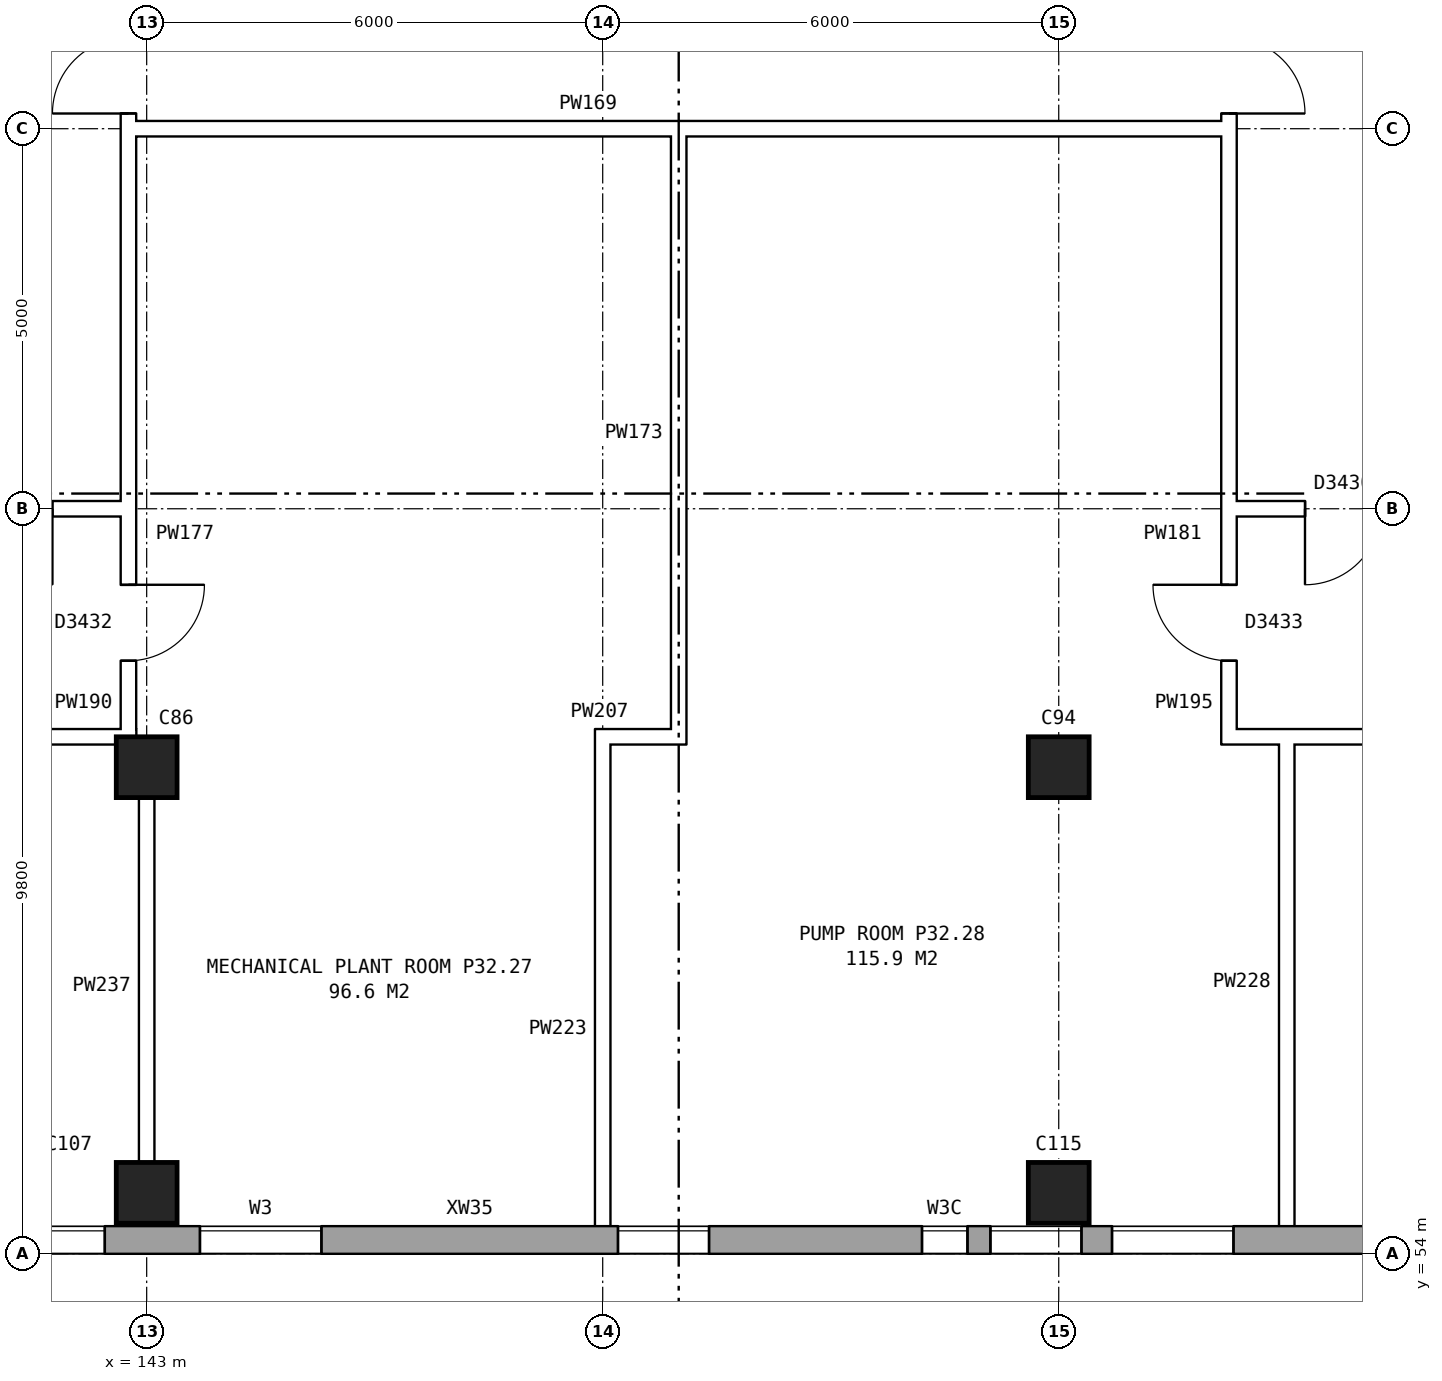
"""IFC4 building model, lengths in metres.
Left out: names, types, materials, properties, quantities, classifications, styles, units other than length and angle.
Written with IfcOpenShell. Run it as: python <this file> out.ifc"""

import sys

from ifc_helpers import new_model, si_unit, direction, frame, frame_2d, origin, origin_2d, place, context, subcontext, project, spatial, rectangle, extrude, element, fill, save


model = new_model("IFC4")
c1 = context("Model", 3, precision=1e-05, world=origin(), true_north=direction((0.0, 1.0)))
c2 = subcontext(c1, "Body", "Model", "MODEL_VIEW")
j1 = project(units=[si_unit("LENGTHUNIT", "METRE"), si_unit("PLANEANGLEUNIT", "RADIAN")], contexts=[c1])
p1 = place(None, origin())
s1 = spatial("IfcSite", under=j1, at=p1, CompositionType="ELEMENT")
p2 = place(p1, origin())
s2 = spatial("IfcBuilding", under=s1, at=p2, CompositionType="ELEMENT")
p3 = place(p2, frame((0.0, 0.0, 115.0)))
s3 = spatial("IfcBuildingStorey", under=s2, at=p3, CompositionType="ELEMENT", Elevation=115.0)
for number, where, z_axis, x_axis in (
    (1, (143.0, 54.8, 0.0), (0.0, 0.0, 1.0), (1.0, 0.0, 0.0)),
    (2, (143.0, 60.4, 0.0), (0.0, 0.0, 1.0), (1.0, 0.0, 0.0)),
    (3, (155.0, 54.8, 0.0), (0.0, 0.0, 1.0), (1.0, 0.0, 0.0)),
    (4, (155.0, 60.4, 0.0), (0.0, 0.0, 1.0), (1.0, 0.0, 0.0)),
):
    element("IfcColumn", number, at=place(p3, frame(where, z_axis=z_axis, x_axis=x_axis)), inside=s3, PredefinedType="COLUMN", context=c2, shape_type="SweptSolid", body=[
        extrude(rectangle(XDim=0.8, YDim=0.8, at=origin_2d()), origin(), (0.0, 0.0, 1.0), 4.2),
    ])
p4 = place(p3, frame((134.075, 54.18, 0.0), z_axis=(0.0, 0.0, 1.0), x_axis=(1.0, 0.0, 0.0)))
e5 = element("IfcWall", 5, at=p4, inside=s3, PredefinedType="STANDARD", context=c2, shape_type="SweptSolid", body=[
    extrude(rectangle(XDim=35.601, YDim=0.36, at=frame_2d((17.8, 0.0))), origin(), (0.0, 0.0, 1.0), 4.2),
])
p5 = place(p4, frame((3.125, 0.0, 1.5)))
e6 = element("IfcOpeningElement", 6, at=p5, cuts=e5, PredefinedType="OPENING", context=c2, shape_type="SweptSolid", body=[
    extrude(rectangle(XDim=1.2, YDim=1.2, at=frame_2d((0.6, 0.6))), frame((0.0, 0.19, 0.0), z_axis=(0.0, -1.0, 0.0), x_axis=(1.0, 0.0, 0.0)), (0.0, 0.0, 1.0), 0.38),
])
p6 = place(p4, frame((7.175, 0.0, 1.5)))
e7 = element("IfcOpeningElement", 7, at=p6, cuts=e5, PredefinedType="OPENING", context=c2, shape_type="SweptSolid", body=[
    extrude(rectangle(XDim=1.2, YDim=1.2, at=frame_2d((0.6, 0.6))), frame((0.0, 0.19, 0.0), z_axis=(0.0, -1.0, 0.0), x_axis=(1.0, 0.0, 0.0)), (0.0, 0.0, 1.0), 0.38),
])
p7 = place(p4, frame((9.625, 0.0, 1.5)))
e8 = element("IfcOpeningElement", 8, at=p7, cuts=e5, PredefinedType="OPENING", context=c2, shape_type="SweptSolid", body=[
    extrude(rectangle(XDim=1.6, YDim=1.2, at=frame_2d((0.8, 0.6))), frame((0.0, 0.19, 0.0), z_axis=(0.0, -1.0, 0.0), x_axis=(1.0, 0.0, 0.0)), (0.0, 0.0, 1.0), 0.38),
])
p8 = place(p4, frame((15.125, 0.0, 1.5)))
e9 = element("IfcOpeningElement", 9, at=p8, cuts=e5, PredefinedType="OPENING", context=c2, shape_type="SweptSolid", body=[
    extrude(rectangle(XDim=1.2, YDim=1.2, at=frame_2d((0.6, 0.6))), frame((0.0, 0.19, 0.0), z_axis=(0.0, -1.0, 0.0), x_axis=(1.0, 0.0, 0.0)), (0.0, 0.0, 1.0), 0.38),
])
p9 = place(p4, frame((19.125, 0.0, 1.5)))
e10 = element("IfcOpeningElement", 10, at=p9, cuts=e5, PredefinedType="OPENING", context=c2, shape_type="SweptSolid", body=[
    extrude(rectangle(XDim=0.6, YDim=1.2, at=frame_2d((0.3, 0.6))), frame((0.0, 0.19, 0.0), z_axis=(0.0, -1.0, 0.0), x_axis=(1.0, 0.0, 0.0)), (0.0, 0.0, 1.0), 0.38),
])
p10 = place(p4, frame((21.625, 0.0, 1.5)))
e11 = element("IfcOpeningElement", 11, at=p10, cuts=e5, PredefinedType="OPENING", context=c2, shape_type="SweptSolid", body=[
    extrude(rectangle(XDim=1.6, YDim=1.2, at=frame_2d((0.8, 0.6))), frame((0.0, 0.19, 0.0), z_axis=(0.0, -1.0, 0.0), x_axis=(1.0, 0.0, 0.0)), (0.0, 0.0, 1.0), 0.38),
])
p11 = place(p4, frame((26.375, 0.0, 1.5)))
e12 = element("IfcOpeningElement", 12, at=p11, cuts=e5, PredefinedType="OPENING", context=c2, shape_type="SweptSolid", body=[
    extrude(rectangle(XDim=1.6, YDim=1.2, at=frame_2d((0.8, 0.6))), frame((0.0, 0.19, 0.0), z_axis=(0.0, -1.0, 0.0), x_axis=(1.0, 0.0, 0.0)), (0.0, 0.0, 1.0), 0.38),
])
p12 = place(p4, frame((31.125, 0.0, 1.5)))
e13 = element("IfcOpeningElement", 13, at=p12, cuts=e5, PredefinedType="OPENING", context=c2, shape_type="SweptSolid", body=[
    extrude(rectangle(XDim=0.6, YDim=1.2, at=frame_2d((0.3, 0.6))), frame((0.0, 0.19, 0.0), z_axis=(0.0, -1.0, 0.0), x_axis=(1.0, 0.0, 0.0)), (0.0, 0.0, 1.0), 0.38),
])
p13 = place(p4, frame((33.625, 0.0, 1.5)))
e14 = element("IfcOpeningElement", 14, at=p13, cuts=e5, PredefinedType="OPENING", context=c2, shape_type="SweptSolid", body=[
    extrude(rectangle(XDim=1.6, YDim=1.2, at=frame_2d((0.8, 0.6))), frame((0.0, 0.19, 0.0), z_axis=(0.0, -1.0, 0.0), x_axis=(1.0, 0.0, 0.0)), (0.0, 0.0, 1.0), 0.38),
])
p14 = place(p4, frame((20.025, 0.0, 1.5)))
e15 = element("IfcOpeningElement", 15, at=p14, cuts=e5, PredefinedType="OPENING", context=c2, shape_type="SweptSolid", body=[
    extrude(rectangle(XDim=1.2, YDim=1.2, at=frame_2d((0.6, 0.6))), frame((0.0, 0.19, 0.0), z_axis=(0.0, -1.0, 0.0), x_axis=(1.0, 0.0, 0.0)), (0.0, 0.0, 1.0), 0.38),
])
p15 = place(p4, frame((32.025, 0.0, 1.5)))
e16 = element("IfcOpeningElement", 16, at=p15, cuts=e5, PredefinedType="OPENING", context=c2, shape_type="SweptSolid", body=[
    extrude(rectangle(XDim=1.2, YDim=1.2, at=frame_2d((0.6, 0.6))), frame((0.0, 0.19, 0.0), z_axis=(0.0, -1.0, 0.0), x_axis=(1.0, 0.0, 0.0)), (0.0, 0.0, 1.0), 0.38),
])
p16 = place(p3, frame((142.76, 63.9, 0.0), z_axis=(0.0, 0.0, 1.0), x_axis=(0.0, 1.0, 0.0)))
e17 = element("IfcWall", 17, at=p16, inside=s3, PredefinedType="PARTITIONING", context=c2, shape_type="SweptSolid", body=[
    extrude(rectangle(XDim=12.2, YDim=0.2, at=frame_2d((6.1, 0.0))), origin(), (0.0, 0.0, 1.0), 4.2),
])
p17 = place(p16, frame((5.1, 0.0, 0.0)))
e18 = element("IfcOpeningElement", 18, at=p17, cuts=e17, PredefinedType="OPENING", context=c2, shape_type="SweptSolid", body=[
    extrude(rectangle(XDim=2.0, YDim=2.1, at=frame_2d((1.0, 1.05))), frame((0.0, 0.11, 0.0), z_axis=(0.0, -1.0, 0.0), x_axis=(1.0, 0.0, 0.0)), (0.0, 0.0, 1.0), 0.22),
])
p18 = place(p3, frame((157.24, 63.9, 0.0), z_axis=(0.0, 0.0, 1.0), x_axis=(0.0, 1.0, 0.0)))
e19 = element("IfcWall", 19, at=p18, inside=s3, PredefinedType="PARTITIONING", context=c2, shape_type="SweptSolid", body=[
    extrude(rectangle(XDim=12.2, YDim=0.2, at=frame_2d((6.1, 0.0))), origin(), (0.0, 0.0, 1.0), 4.2),
])
p19 = place(p18, frame((5.1, 0.0, 0.0)))
e20 = element("IfcOpeningElement", 20, at=p19, cuts=e19, PredefinedType="OPENING", context=c2, shape_type="SweptSolid", body=[
    extrude(rectangle(XDim=2.0, YDim=2.1, at=frame_2d((1.0, 1.05))), frame((0.0, 0.11, 0.0), z_axis=(0.0, -1.0, 0.0), x_axis=(1.0, 0.0, 0.0)), (0.0, 0.0, 1.0), 0.22),
])
p20 = place(p3, frame((131.24, 60.8, 0.0), z_axis=(0.0, 0.0, 1.0), x_axis=(1.0, 0.0, 0.0)))
e21 = element("IfcWall", 21, at=p20, inside=s3, PredefinedType="PARTITIONING", context=c2, shape_type="SweptSolid", body=[
    extrude(rectangle(XDim=11.622, YDim=0.2, at=frame_2d((5.811, 0.0))), origin(), (0.0, 0.0, 1.0), 4.2),
])
p21 = place(p20, frame((2.44, 0.0, 0.0)))
e22 = element("IfcOpeningElement", 22, at=p21, cuts=e21, PredefinedType="OPENING", context=c2, shape_type="SweptSolid", body=[
    extrude(rectangle(XDim=1.0, YDim=2.1, at=frame_2d((0.5, 1.05))), frame((0.0, 0.11, 0.0), z_axis=(0.0, -1.0, 0.0), x_axis=(1.0, 0.0, 0.0)), (0.0, 0.0, 1.0), 0.22),
])
p22 = place(p20, frame((8.141, 0.0, 0.0)))
e23 = element("IfcOpeningElement", 23, at=p22, cuts=e21, PredefinedType="OPENING", context=c2, shape_type="SweptSolid", body=[
    extrude(rectangle(XDim=1.0, YDim=2.1, at=frame_2d((0.5, 1.05))), frame((0.0, 0.11, 0.0), z_axis=(0.0, -1.0, 0.0), x_axis=(1.0, 0.0, 0.0)), (0.0, 0.0, 1.0), 0.22),
])
p23 = place(p3, frame((148.9, 60.8, 0.0), z_axis=(0.0, 0.0, 1.0), x_axis=(1.0, 0.0, 0.0)))
e24 = element("IfcWall", 24, at=p23, inside=s3, PredefinedType="PARTITIONING", context=c2, shape_type="SweptSolid", body=[
    extrude(rectangle(XDim=1.2, YDim=0.2, at=frame_2d((0.6, 0.0))), origin(), (0.0, 0.0, 1.0), 4.2),
])
p24 = place(p3, frame((157.14, 60.8, 0.0), z_axis=(0.0, 0.0, 1.0), x_axis=(1.0, 0.0, 0.0)))
e25 = element("IfcWall", 25, at=p24, inside=s3, PredefinedType="PARTITIONING", context=c2, shape_type="SweptSolid", body=[
    extrude(rectangle(XDim=15.37, YDim=0.2, at=frame_2d((7.685, 0.0))), origin(), (0.0, 0.0, 1.0), 4.2),
])
p25 = place(p24, frame((3.36, 0.0, 0.0)))
e26 = element("IfcOpeningElement", 26, at=p25, cuts=e25, PredefinedType="OPENING", context=c2, shape_type="SweptSolid", body=[
    extrude(rectangle(XDim=1.0, YDim=2.1, at=frame_2d((0.5, 1.05))), frame((0.0, 0.11, 0.0), z_axis=(0.0, -1.0, 0.0), x_axis=(1.0, 0.0, 0.0)), (0.0, 0.0, 1.0), 0.22),
])
p26 = place(p24, frame((8.155, 0.0, 0.0)))
e27 = element("IfcOpeningElement", 27, at=p26, cuts=e25, PredefinedType="OPENING", context=c2, shape_type="SweptSolid", body=[
    extrude(rectangle(XDim=1.0, YDim=2.1, at=frame_2d((0.5, 1.05))), frame((0.0, 0.11, 0.0), z_axis=(0.0, -1.0, 0.0), x_axis=(1.0, 0.0, 0.0)), (0.0, 0.0, 1.0), 0.22),
])
p27 = place(p3, frame((139.76, 63.8, 0.0), z_axis=(0.0, 0.0, 1.0), x_axis=(1.0, 0.0, 0.0)))
e28 = element("IfcWall", 28, at=p27, inside=s3, PredefinedType="PARTITIONING", context=c2, shape_type="SweptSolid", body=[
    extrude(rectangle(XDim=3.1, YDim=0.2, at=frame_2d((1.55, 0.0))), origin(), (0.0, 0.0, 1.0), 4.2),
])
p28 = place(p27, frame((1.0, 0.0, 0.0)))
e29 = element("IfcOpeningElement", 29, at=p28, cuts=e28, PredefinedType="OPENING", context=c2, shape_type="SweptSolid", body=[
    extrude(rectangle(XDim=1.0, YDim=2.1, at=frame_2d((0.5, 1.05))), frame((0.0, 0.11, 0.0), z_axis=(0.0, -1.0, 0.0), x_axis=(1.0, 0.0, 0.0)), (0.0, 0.0, 1.0), 0.22),
])
p29 = place(p3, frame((157.14, 63.8, 0.0), z_axis=(0.0, 0.0, 1.0), x_axis=(1.0, 0.0, 0.0)))
e30 = element("IfcWall", 30, at=p29, inside=s3, PredefinedType="PARTITIONING", context=c2, shape_type="SweptSolid", body=[
    extrude(rectangle(XDim=3.1, YDim=0.2, at=frame_2d((1.55, 0.0))), origin(), (0.0, 0.0, 1.0), 4.2),
])
p30 = place(p29, frame((1.1, 0.0, 0.0)))
e31 = element("IfcOpeningElement", 31, at=p30, cuts=e30, PredefinedType="OPENING", context=c2, shape_type="SweptSolid", body=[
    extrude(rectangle(XDim=1.0, YDim=2.1, at=frame_2d((0.5, 1.05))), frame((0.0, 0.11, 0.0), z_axis=(0.0, -1.0, 0.0), x_axis=(1.0, 0.0, 0.0)), (0.0, 0.0, 1.0), 0.22),
])
p31 = place(p3, frame((142.76, 68.8, 0.0), z_axis=(0.0, 0.0, 1.0), x_axis=(1.0, 0.0, 0.0)))
e32 = element("IfcWall", 32, at=p31, inside=s3, PredefinedType="PARTITIONING", context=c2, shape_type="SweptSolid", body=[
    extrude(rectangle(XDim=14.48, YDim=0.2, at=frame_2d((7.24, 0.0))), origin(), (0.0, 0.0, 1.0), 4.2),
])
p32 = place(p3, frame((142.76, 60.7, 0.0), z_axis=(0.0, 0.0, 1.0), x_axis=(0.0, 1.0, 0.0)))
e33 = element("IfcWall", 33, at=p32, inside=s3, PredefinedType="PARTITIONING", context=c2, shape_type="SweptSolid", body=[
    extrude(rectangle(XDim=3.2, YDim=0.2, at=frame_2d((1.6, 0.0))), origin(), (0.0, 0.0, 1.0), 4.2),
])
p33 = place(p32, frame((1.1, 0.0, 0.0)))
e34 = element("IfcOpeningElement", 34, at=p33, cuts=e33, PredefinedType="OPENING", context=c2, shape_type="SweptSolid", body=[
    extrude(rectangle(XDim=1.0, YDim=2.1, at=frame_2d((0.5, 1.05))), frame((0.0, 0.11, 0.0), z_axis=(0.0, -1.0, 0.0), x_axis=(1.0, 0.0, 0.0)), (0.0, 0.0, 1.0), 0.22),
])
p34 = place(p3, frame((143.0, 54.24, 0.0), z_axis=(0.0, 0.0, 1.0), x_axis=(0.0, 1.0, 0.0)))
e35 = element("IfcWall", 35, at=p34, inside=s3, PredefinedType="PARTITIONING", context=c2, shape_type="SweptSolid", body=[
    extrude(rectangle(XDim=6.56, YDim=0.2, at=frame_2d((3.28, 0.0))), origin(), (0.0, 0.0, 1.0), 4.2),
])
p35 = place(p3, frame((149.0, 54.24, 0.0), z_axis=(0.0, 0.0, 1.0), x_axis=(0.0, 1.0, 0.0)))
e36 = element("IfcWall", 36, at=p35, inside=s3, PredefinedType="PARTITIONING", context=c2, shape_type="SweptSolid", body=[
    extrude(rectangle(XDim=6.66, YDim=0.2, at=frame_2d((3.33, 0.0))), origin(), (0.0, 0.0, 1.0), 4.2),
])
p36 = place(p3, frame((150.0, 60.7, 0.0), z_axis=(0.0, 0.0, 1.0), x_axis=(0.0, 1.0, 0.0)))
e37 = element("IfcWall", 37, at=p36, inside=s3, PredefinedType="PARTITIONING", context=c2, shape_type="SweptSolid", body=[
    extrude(rectangle(XDim=8.2, YDim=0.2, at=frame_2d((4.1, 0.0))), origin(), (0.0, 0.0, 1.0), 4.2),
])
p37 = place(p3, frame((157.24, 60.7, 0.0), z_axis=(0.0, 0.0, 1.0), x_axis=(0.0, 1.0, 0.0)))
e38 = element("IfcWall", 38, at=p37, inside=s3, PredefinedType="PARTITIONING", context=c2, shape_type="SweptSolid", body=[
    extrude(rectangle(XDim=3.2, YDim=0.2, at=frame_2d((1.6, 0.0))), origin(), (0.0, 0.0, 1.0), 4.2),
])
p38 = place(p37, frame((1.1, 0.0, 0.0)))
e39 = element("IfcOpeningElement", 39, at=p38, cuts=e38, PredefinedType="OPENING", context=c2, shape_type="SweptSolid", body=[
    extrude(rectangle(XDim=1.0, YDim=2.1, at=frame_2d((0.5, 1.05))), frame((0.0, 0.11, 0.0), z_axis=(0.0, -1.0, 0.0), x_axis=(1.0, 0.0, 0.0)), (0.0, 0.0, 1.0), 0.22),
])
p39 = place(p3, frame((158.0, 54.24, 0.0), z_axis=(0.0, 0.0, 1.0), x_axis=(0.0, 1.0, 0.0)))
e40 = element("IfcWall", 40, at=p39, inside=s3, PredefinedType="PARTITIONING", context=c2, shape_type="SweptSolid", body=[
    extrude(rectangle(XDim=6.66, YDim=0.2, at=frame_2d((3.33, 0.0))), origin(), (0.0, 0.0, 1.0), 4.2),
])
p40 = place(p6, origin())
e41 = element("IfcWindow", 41, at=p40, inside=s3, PartitioningType="DOUBLE_PANEL_HORIZONTAL", PredefinedType="WINDOW", context=c2, shape_type="SweptSolid", body=[
    extrude(rectangle(XDim=1.2, YDim=1.2, at=frame_2d((0.6, 0.6))), frame((0.0, 0.15, 0.0), z_axis=(0.0, -1.0, 0.0), x_axis=(1.0, 0.0, 0.0)), (0.0, 0.0, 1.0), 0.06),
])
fill(e7, e41)
p41 = place(p7, origin())
e42 = element("IfcWindow", 42, at=p41, inside=s3, PartitioningType="DOUBLE_PANEL_HORIZONTAL", PredefinedType="WINDOW", context=c2, shape_type="SweptSolid", body=[
    extrude(rectangle(XDim=1.6, YDim=1.2, at=frame_2d((0.8, 0.6))), frame((0.0, 0.15, 0.0), z_axis=(0.0, -1.0, 0.0), x_axis=(1.0, 0.0, 0.0)), (0.0, 0.0, 1.0), 0.06),
])
fill(e8, e42)
p42 = place(p8, origin())
e43 = element("IfcWindow", 43, at=p42, inside=s3, PartitioningType="DOUBLE_PANEL_HORIZONTAL", PredefinedType="WINDOW", context=c2, shape_type="SweptSolid", body=[
    extrude(rectangle(XDim=1.2, YDim=1.2, at=frame_2d((0.6, 0.6))), frame((0.0, 0.15, 0.0), z_axis=(0.0, -1.0, 0.0), x_axis=(1.0, 0.0, 0.0)), (0.0, 0.0, 1.0), 0.06),
])
fill(e9, e43)
p43 = place(p9, origin())
e44 = element("IfcWindow", 44, at=p43, inside=s3, PartitioningType="DOUBLE_PANEL_HORIZONTAL", PredefinedType="WINDOW", context=c2, shape_type="SweptSolid", body=[
    extrude(rectangle(XDim=0.6, YDim=1.2, at=frame_2d((0.3, 0.6))), frame((0.0, 0.15, 0.0), z_axis=(0.0, -1.0, 0.0), x_axis=(1.0, 0.0, 0.0)), (0.0, 0.0, 1.0), 0.06),
])
fill(e10, e44)
p44 = place(p10, origin())
e45 = element("IfcWindow", 45, at=p44, inside=s3, PartitioningType="DOUBLE_PANEL_HORIZONTAL", PredefinedType="WINDOW", context=c2, shape_type="SweptSolid", body=[
    extrude(rectangle(XDim=1.6, YDim=1.2, at=frame_2d((0.8, 0.6))), frame((0.0, 0.15, 0.0), z_axis=(0.0, -1.0, 0.0), x_axis=(1.0, 0.0, 0.0)), (0.0, 0.0, 1.0), 0.06),
])
fill(e11, e45)
p45 = place(p17, origin())
e46 = element("IfcDoor", 46, at=p45, inside=s3, OperationType="DOUBLE_DOOR_SINGLE_SWING", PredefinedType="DOOR", context=c2, shape_type="SweptSolid", body=[
    extrude(rectangle(XDim=2.0, YDim=2.1, at=frame_2d((1.0, 1.05))), frame((0.0, 0.025, 0.0), z_axis=(0.0, -1.0, 0.0), x_axis=(1.0, 0.0, 0.0)), (0.0, 0.0, 1.0), 0.05),
])
fill(e18, e46)
p46 = place(p19, frame((2.0, 0.0, 0.0), z_axis=(0.0, 0.0, 1.0), x_axis=(-1.0, 0.0, 0.0)))
e47 = element("IfcDoor", 47, at=p46, inside=s3, OperationType="DOUBLE_DOOR_SINGLE_SWING", PredefinedType="DOOR", context=c2, shape_type="SweptSolid", body=[
    extrude(rectangle(XDim=2.0, YDim=2.1, at=frame_2d((1.0, 1.05))), frame((0.0, 0.025, 0.0), z_axis=(0.0, -1.0, 0.0), x_axis=(1.0, 0.0, 0.0)), (0.0, 0.0, 1.0), 0.05),
])
fill(e20, e47)
p47 = place(p30, frame((1.0, 0.0, 0.0), z_axis=(0.0, 0.0, 1.0), x_axis=(-1.0, 0.0, 0.0)))
e48 = element("IfcDoor", 48, at=p47, inside=s3, OperationType="SINGLE_SWING_RIGHT", PredefinedType="DOOR", context=c2, shape_type="SweptSolid", body=[
    extrude(rectangle(XDim=1.0, YDim=2.1, at=frame_2d((0.5, 1.05))), frame((0.0, 0.025, 0.0), z_axis=(0.0, -1.0, 0.0), x_axis=(1.0, 0.0, 0.0)), (0.0, 0.0, 1.0), 0.05),
])
fill(e31, e48)
p48 = place(p33, frame((1.0, 0.0, 0.0), z_axis=(0.0, 0.0, 1.0), x_axis=(-1.0, 0.0, 0.0)))
e49 = element("IfcDoor", 49, at=p48, inside=s3, OperationType="SINGLE_SWING_LEFT", PredefinedType="DOOR", context=c2, shape_type="SweptSolid", body=[
    extrude(rectangle(XDim=1.0, YDim=2.1, at=frame_2d((0.5, 1.05))), frame((0.0, 0.025, 0.0), z_axis=(0.0, -1.0, 0.0), x_axis=(1.0, 0.0, 0.0)), (0.0, 0.0, 1.0), 0.05),
])
fill(e34, e49)
p49 = place(p38, origin())
e50 = element("IfcDoor", 50, at=p49, inside=s3, OperationType="SINGLE_SWING_RIGHT", PredefinedType="DOOR", context=c2, shape_type="SweptSolid", body=[
    extrude(rectangle(XDim=1.0, YDim=2.1, at=frame_2d((0.5, 1.05))), frame((0.0, 0.025, 0.0), z_axis=(0.0, -1.0, 0.0), x_axis=(1.0, 0.0, 0.0)), (0.0, 0.0, 1.0), 0.05),
])
fill(e39, e50)
p50 = place(p14, origin())
e51 = element("IfcWindow", 51, at=p50, inside=s3, PartitioningType="DOUBLE_PANEL_HORIZONTAL", PredefinedType="WINDOW", context=c2, shape_type="SweptSolid", body=[
    extrude(rectangle(XDim=1.2, YDim=1.2, at=frame_2d((0.6, 0.6))), frame((0.0, 0.15, 0.0), z_axis=(0.0, -1.0, 0.0), x_axis=(1.0, 0.0, 0.0)), (0.0, 0.0, 1.0), 0.06),
])
fill(e15, e51)
save(model, sys.argv[1])
